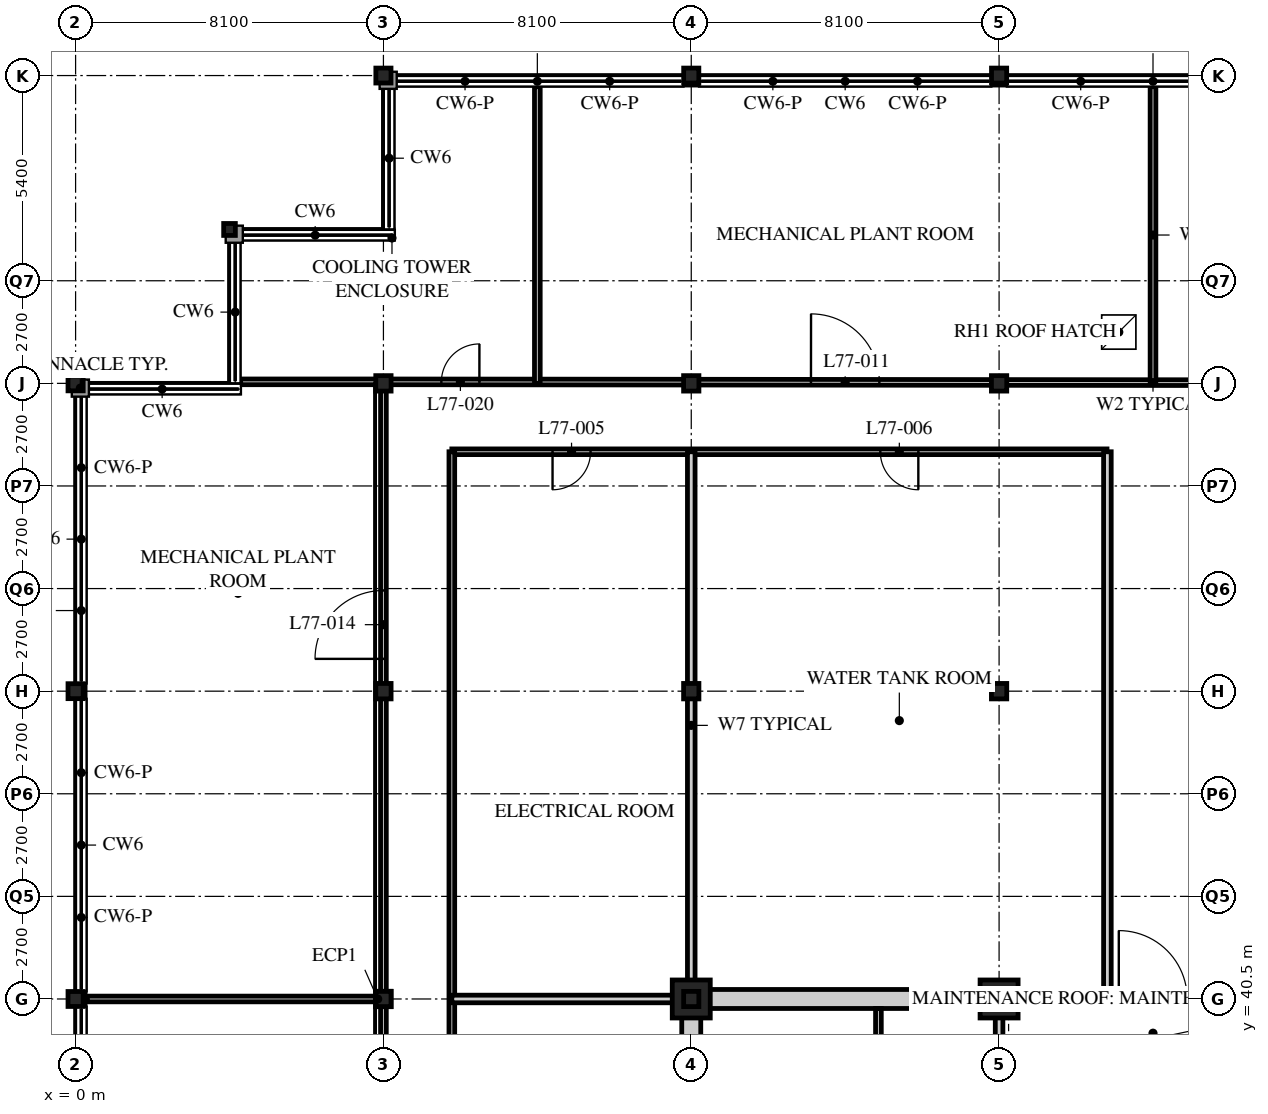
"""IFC4 building model, lengths in metres.
Left out: names, types, materials, properties, quantities, classifications, styles, units other than length and angle.
Written with IfcOpenShell. Run it as: python <this file> out.ifc"""

import sys

from ifc_helpers import new_model, si_unit, direction, frame, frame_2d, origin, origin_2d, place, context, subcontext, project, spatial, rectangle, hollow_rectangle, i_section, extrude, element, fill, save


model = new_model("IFC4")
c1 = context("Model", 3, precision=1e-05, world=origin(), true_north=direction((0.0, 1.0)))
c2 = subcontext(c1, "Body", "Model", "MODEL_VIEW")
j1 = project(units=[si_unit("LENGTHUNIT", "METRE"), si_unit("PLANEANGLEUNIT", "RADIAN")], contexts=[c1])
p1 = place(None, origin())
s1 = spatial("IfcSite", under=j1, at=p1, CompositionType="ELEMENT")
p2 = place(p1, origin())
s2 = spatial("IfcBuilding", under=s1, at=p2, CompositionType="ELEMENT")
p3 = place(p2, frame((0.0, 0.0, 303.9)))
s3 = spatial("IfcBuildingStorey", under=s2, at=p3, CompositionType="ELEMENT", Elevation=303.9)
for number, where, z_axis, x_axis in (
    (1, (0.0, 40.5, 0.0), (0.0, 0.0, 1.0), (1.0, 0.0, 0.0)),
    (2, (0.0, 48.6, 0.0), (0.0, 0.0, 1.0), (1.0, 0.0, 0.0)),
    (3, (0.0, 56.7, 0.0), (0.0, 0.0, 1.0), (1.0, 0.0, 0.0)),
):
    element("IfcColumn", number, at=place(p3, frame(where, z_axis=z_axis, x_axis=x_axis)), inside=s3, PredefinedType="COLUMN", context=c2, shape_type="SweptSolid", body=[
        extrude(i_section(OverallWidth=0.399, OverallDepth=0.394, WebThickness=0.023, FlangeThickness=0.037, FilletRadius=0.015, at=origin_2d()), origin(), (0.0, 0.0, 1.0), 6.0),
    ])
p4 = place(p3, frame((4.05, 60.75, 0.0), z_axis=(0.0, 0.0, 1.0), x_axis=(1.0, 0.0, 0.0)))
e4 = element("IfcColumn", 4, at=p4, inside=s3, PredefinedType="COLUMN", context=c2, shape_type="SweptSolid", body=[
    extrude(i_section(OverallWidth=0.307, OverallDepth=0.314, WebThickness=0.012, FlangeThickness=0.019, FilletRadius=0.015, at=origin_2d()), origin(), (0.0, 0.0, 1.0), 6.0),
])
for number, where, z_axis, x_axis in (
    (5, (8.1, 40.5, 0.0), (0.0, 0.0, 1.0), (1.0, 0.0, 0.0)),
    (6, (8.1, 48.6, 0.0), (0.0, 0.0, 1.0), (1.0, 0.0, 0.0)),
    (7, (8.1, 56.7, 0.0), (0.0, 0.0, 1.0), (1.0, 0.0, 0.0)),
):
    element("IfcColumn", number, at=place(p3, frame(where, z_axis=z_axis, x_axis=x_axis)), inside=s3, PredefinedType="COLUMN", context=c2, shape_type="SweptSolid", body=[
        extrude(i_section(OverallWidth=0.403, OverallDepth=0.406, WebThickness=0.027, FlangeThickness=0.043, FilletRadius=0.015, at=origin_2d()), origin(), (0.0, 0.0, 1.0), 6.0),
    ])
p5 = place(p3, frame((8.1, 64.8, 0.0), z_axis=(0.0, 0.0, 1.0), x_axis=(1.0, 0.0, 0.0)))
e8 = element("IfcColumn", 8, at=p5, inside=s3, PredefinedType="COLUMN", context=c2, shape_type="SweptSolid", body=[
    extrude(i_section(OverallWidth=0.399, OverallDepth=0.394, WebThickness=0.023, FlangeThickness=0.037, FilletRadius=0.015, at=origin_2d()), origin(), (0.0, 0.0, 1.0), 6.0),
])
p6 = place(p3, frame((16.2, 40.5, 0.0), z_axis=(0.0, 0.0, 1.0), x_axis=(1.0, 0.0, 0.0)))
e9 = element("IfcColumn", 9, at=p6, inside=s3, PredefinedType="COLUMN", context=c2, shape_type="SweptSolid", body=[
    extrude(hollow_rectangle(XDim=1.0, YDim=1.0, WallThickness=0.1, at=origin_2d()), origin(), (0.0, 0.0, 1.0), 6.0),
])
for number, where, z_axis, x_axis in (
    (10, (16.2, 48.6, 0.0), (0.0, 0.0, 1.0), (1.0, 0.0, 0.0)),
    (11, (16.2, 56.7, 0.0), (0.0, 0.0, 1.0), (1.0, 0.0, 0.0)),
):
    element("IfcColumn", number, at=place(p3, frame(where, z_axis=z_axis, x_axis=x_axis)), inside=s3, PredefinedType="COLUMN", context=c2, shape_type="SweptSolid", body=[
        extrude(i_section(OverallWidth=0.403, OverallDepth=0.406, WebThickness=0.027, FlangeThickness=0.043, FilletRadius=0.015, at=origin_2d()), origin(), (0.0, 0.0, 1.0), 6.0),
    ])
p7 = place(p3, frame((16.2, 64.8, 0.0), z_axis=(0.0, 0.0, 1.0), x_axis=(1.0, 0.0, 0.0)))
e12 = element("IfcColumn", 12, at=p7, inside=s3, PredefinedType="COLUMN", context=c2, shape_type="SweptSolid", body=[
    extrude(i_section(OverallWidth=0.399, OverallDepth=0.394, WebThickness=0.023, FlangeThickness=0.037, FilletRadius=0.015, at=origin_2d()), origin(), (0.0, 0.0, 1.0), 6.0),
])
p8 = place(p3, frame((24.3, 40.5, 0.0), z_axis=(0.0, 0.0, 1.0), x_axis=(1.0, 0.0, 0.0)))
e13 = element("IfcColumn", 13, at=p8, inside=s3, PredefinedType="COLUMN", context=c2, shape_type="SweptSolid", body=[
    extrude(hollow_rectangle(XDim=1.0, YDim=1.0, WallThickness=0.1, at=origin_2d()), origin(), (0.0, 0.0, 1.0), 6.0),
])
for number, where, z_axis, x_axis in (
    (14, (24.3, 48.6, 0.0), (0.0, 0.0, 1.0), (1.0, 0.0, 0.0)),
    (15, (24.3, 56.7, 0.0), (0.0, 0.0, 1.0), (1.0, 0.0, 0.0)),
):
    element("IfcColumn", number, at=place(p3, frame(where, z_axis=z_axis, x_axis=x_axis)), inside=s3, PredefinedType="COLUMN", context=c2, shape_type="SweptSolid", body=[
        extrude(i_section(OverallWidth=0.403, OverallDepth=0.406, WebThickness=0.027, FlangeThickness=0.043, FilletRadius=0.015, at=origin_2d()), origin(), (0.0, 0.0, 1.0), 6.0),
    ])
p9 = place(p3, frame((24.3, 64.8, 0.0), z_axis=(0.0, 0.0, 1.0), x_axis=(1.0, 0.0, 0.0)))
e16 = element("IfcColumn", 16, at=p9, inside=s3, PredefinedType="COLUMN", context=c2, shape_type="SweptSolid", body=[
    extrude(i_section(OverallWidth=0.399, OverallDepth=0.394, WebThickness=0.023, FlangeThickness=0.037, FilletRadius=0.015, at=origin_2d()), origin(), (0.0, 0.0, 1.0), 6.0),
])
p10 = place(p3, frame((48.35, 64.675, 6.0), z_axis=(0.0, 0.0, 1.0), x_axis=(-1.0, 0.0, 0.0)))
e17 = element("IfcWall", 17, at=p10, inside=s3, PredefinedType="PARAPET", context=c2, shape_type="SweptSolid", body=[
    extrude(rectangle(XDim=40.25, YDim=0.25, at=frame_2d((20.125, 0.0))), origin(), (0.0, 0.0, 1.0), 1.285),
])
p11 = place(p3, frame((8.225, 64.55, 6.0), z_axis=(0.0, 0.0, 1.0), x_axis=(0.0, -1.0, 0.0)))
e18 = element("IfcWall", 18, at=p11, inside=s3, PredefinedType="PARAPET", context=c2, shape_type="SweptSolid", body=[
    extrude(rectangle(XDim=3.8, YDim=0.25, at=frame_2d((1.9, 0.0))), origin(), (0.0, 0.0, 1.0), 1.285),
])
p12 = place(p3, frame((8.35, 60.625, 6.0), z_axis=(0.0, 0.0, 1.0), x_axis=(-1.0, 0.0, 0.0)))
e19 = element("IfcWall", 19, at=p12, inside=s3, PredefinedType="PARAPET", context=c2, shape_type="SweptSolid", body=[
    extrude(rectangle(XDim=4.3, YDim=0.25, at=frame_2d((2.15, 0.0))), origin(), (0.0, 0.0, 1.0), 1.285),
])
p13 = place(p3, frame((4.175, 60.5, 6.0), z_axis=(0.0, 0.0, 1.0), x_axis=(0.0, -1.0, 0.0)))
e20 = element("IfcWall", 20, at=p13, inside=s3, PredefinedType="PARAPET", context=c2, shape_type="SweptSolid", body=[
    extrude(rectangle(XDim=3.8, YDim=0.25, at=frame_2d((1.9, 0.0))), origin(), (0.0, 0.0, 1.0), 1.285),
])
p14 = place(p3, frame((4.3, 56.575, 6.0), z_axis=(0.0, 0.0, 1.0), x_axis=(-1.0, 0.0, 0.0)))
e21 = element("IfcWall", 21, at=p14, inside=s3, PredefinedType="PARAPET", context=c2, shape_type="SweptSolid", body=[
    extrude(rectangle(XDim=4.3, YDim=0.25, at=frame_2d((2.15, 0.0))), origin(), (0.0, 0.0, 1.0), 1.285),
])
p15 = place(p3, frame((0.125, 56.45, 6.0), z_axis=(0.0, 0.0, 1.0), x_axis=(0.0, -1.0, 0.0)))
e22 = element("IfcWall", 22, at=p15, inside=s3, PredefinedType="PARAPET", context=c2, shape_type="SweptSolid", body=[
    extrude(rectangle(XDim=32.15, YDim=0.25, at=frame_2d((16.075, 0.0))), origin(), (0.0, 0.0, 1.0), 1.285),
])
for number, where, z_axis, x_axis in (
    (23, (8.1, 40.5, 6.0), (0.0, 0.0, 1.0), (1.0, 0.0, 0.0)),
    (24, (16.2, 40.5, 6.0), (0.0, 0.0, 1.0), (1.0, 0.0, 0.0)),
    (25, (24.3, 40.5, 6.0), (0.0, 0.0, 1.0), (1.0, 0.0, 0.0)),
):
    element("IfcColumn", number, at=place(p3, frame(where, z_axis=z_axis, x_axis=x_axis)), inside=s3, PredefinedType="COLUMN", context=c2, shape_type="SweptSolid", body=[
        extrude(hollow_rectangle(XDim=0.4, YDim=0.4, WallThickness=0.016, at=origin_2d()), origin(), (0.0, 0.0, 1.0), 13.896),
    ])
p16 = place(p3, frame((8.1, 56.74, 0.0), z_axis=(0.0, 0.0, 1.0), x_axis=(0.999999511317, -0.000988618344, 0.0)))
e26 = element("IfcWall", 26, at=p16, inside=s3, PredefinedType="PARTITIONING", context=c2, shape_type="SweptSolid", body=[
    extrude(rectangle(XDim=40.5, YDim=0.15, at=frame_2d((20.25, 0.0))), origin(), (0.0, 0.0, 1.0), 5.038),
])
p17 = place(p16, frame((11.25, 0.0, 0.0)))
e27 = element("IfcOpeningElement", 27, at=p17, cuts=e26, PredefinedType="OPENING", context=c2, shape_type="SweptSolid", body=[
    extrude(rectangle(XDim=1.8, YDim=2.4, at=frame_2d((0.9, 1.2))), frame((0.0, 0.085, 0.0), z_axis=(0.0, -1.0, 0.0), x_axis=(1.0, 0.0, 0.0)), (0.0, 0.0, 1.0), 0.17),
])
p18 = place(p16, frame((27.45, 0.0, 0.0)))
e28 = element("IfcOpeningElement", 28, at=p18, cuts=e26, PredefinedType="OPENING", context=c2, shape_type="SweptSolid", body=[
    extrude(rectangle(XDim=1.8, YDim=2.4, at=frame_2d((0.9, 1.2))), frame((0.0, 0.085, 0.0), z_axis=(0.0, -1.0, 0.0), x_axis=(1.0, 0.0, 0.0)), (0.0, 0.0, 1.0), 0.17),
])
p19 = place(p16, frame((37.975, 0.0, 0.0)))
e29 = element("IfcOpeningElement", 29, at=p19, cuts=e26, PredefinedType="OPENING", context=c2, shape_type="SweptSolid", body=[
    extrude(rectangle(XDim=1.0, YDim=2.1, at=frame_2d((0.5, 1.05))), frame((0.0, 0.085, 0.0), z_axis=(0.0, -1.0, 0.0), x_axis=(1.0, 0.0, 0.0)), (0.0, 0.0, 1.0), 0.17),
])
p20 = place(p16, frame((1.525, 0.0, 0.0)))
e30 = element("IfcOpeningElement", 30, at=p20, cuts=e26, PredefinedType="OPENING", context=c2, shape_type="SweptSolid", body=[
    extrude(rectangle(XDim=1.0, YDim=2.1, at=frame_2d((0.5, 1.05))), frame((0.0, 0.085, 0.0), z_axis=(0.0, -1.0, 0.0), x_axis=(1.0, 0.0, 0.0)), (0.0, 0.0, 1.0), 0.17),
])
p21 = place(p3, frame((8.1, 22.5, 0.0), z_axis=(0.0, 0.0, 1.0), x_axis=(0.0, 1.0, 0.0)))
e31 = element("IfcWall", 31, at=p21, inside=s3, PredefinedType="PARTITIONING", context=c2, shape_type="SweptSolid", body=[
    extrude(rectangle(XDim=34.24, YDim=0.15, at=frame_2d((17.12, 0.0))), origin(), (0.0, 0.0, 1.0), 5.038),
])
p22 = place(p21, frame((7.1, 0.0, 0.0)))
e32 = element("IfcOpeningElement", 32, at=p22, cuts=e31, PredefinedType="OPENING", context=c2, shape_type="SweptSolid", body=[
    extrude(rectangle(XDim=1.8, YDim=2.4, at=frame_2d((0.9, 1.2))), frame((0.0, 0.085, 0.0), z_axis=(0.0, -1.0, 0.0), x_axis=(1.0, 0.0, 0.0)), (0.0, 0.0, 1.0), 0.17),
])
p23 = place(p21, frame((26.95, 0.0, 0.0)))
e33 = element("IfcOpeningElement", 33, at=p23, cuts=e31, PredefinedType="OPENING", context=c2, shape_type="SweptSolid", body=[
    extrude(rectangle(XDim=1.8, YDim=2.4, at=frame_2d((0.9, 1.2))), frame((0.0, 0.085, 0.0), z_axis=(0.0, -1.0, 0.0), x_axis=(1.0, 0.0, 0.0)), (0.0, 0.0, 1.0), 0.17),
])
p24 = place(p3, frame((27.14, 54.9, 0.0), z_axis=(0.0, 0.0, 1.0), x_axis=(-1.0, 0.0, 0.0)))
e34 = element("IfcWall", 34, at=p24, inside=s3, PredefinedType="PARTITIONING", context=c2, shape_type="SweptSolid", body=[
    extrude(rectangle(XDim=17.24, YDim=0.15, at=frame_2d((8.62, 0.0))), origin(), (0.0, 0.0, 1.0), 5.8),
])
p25 = place(p24, frame((13.59, 0.0, 0.0)))
e35 = element("IfcOpeningElement", 35, at=p25, cuts=e34, PredefinedType="OPENING", context=c2, shape_type="SweptSolid", body=[
    extrude(rectangle(XDim=1.0, YDim=2.1, at=frame_2d((0.5, 1.05))), frame((0.0, 0.085, 0.0), z_axis=(0.0, -1.0, 0.0), x_axis=(1.0, 0.0, 0.0)), (0.0, 0.0, 1.0), 0.17),
])
p26 = place(p24, frame((4.965, 0.0, 0.0)))
e36 = element("IfcOpeningElement", 36, at=p26, cuts=e34, PredefinedType="OPENING", context=c2, shape_type="SweptSolid", body=[
    extrude(rectangle(XDim=1.0, YDim=2.1, at=frame_2d((0.5, 1.05))), frame((0.0, 0.085, 0.0), z_axis=(0.0, -1.0, 0.0), x_axis=(1.0, 0.0, 0.0)), (0.0, 0.0, 1.0), 0.17),
])
p27 = place(p3, frame((9.9, 54.9, 0.0), z_axis=(0.0, 0.0, 1.0), x_axis=(0.0, -1.0, 0.0)))
e37 = element("IfcWall", 37, at=p27, inside=s3, PredefinedType="PARTITIONING", context=c2, shape_type="SweptSolid", body=[
    extrude(rectangle(XDim=30.6, YDim=0.15, at=frame_2d((15.3, 0.0))), origin(), (0.0, 0.0, 1.0), 5.8),
])
p28 = place(p27, frame((26.05, 0.0, 0.0)))
e38 = element("IfcOpeningElement", 38, at=p28, cuts=e37, PredefinedType="OPENING", context=c2, shape_type="SweptSolid", body=[
    extrude(rectangle(XDim=1.0, YDim=2.1, at=frame_2d((0.5, 1.05))), frame((0.0, 0.085, 0.0), z_axis=(0.0, -1.0, 0.0), x_axis=(1.0, 0.0, 0.0)), (0.0, 0.0, 1.0), 0.17),
])
p29 = place(p27, frame((17.95, 0.0, 0.0)))
e39 = element("IfcOpeningElement", 39, at=p29, cuts=e37, PredefinedType="OPENING", context=c2, shape_type="SweptSolid", body=[
    extrude(rectangle(XDim=1.0, YDim=2.1, at=frame_2d((0.5, 1.05))), frame((0.0, 0.085, 0.0), z_axis=(0.0, -1.0, 0.0), x_axis=(1.0, 0.0, 0.0)), (0.0, 0.0, 1.0), 0.17),
])
p30 = place(p3, frame((16.2, 40.5, 0.0), z_axis=(0.0, 0.0, 1.0), x_axis=(0.0, 1.0, 0.0)))
e40 = element("IfcWall", 40, at=p30, inside=s3, PredefinedType="SOLIDWALL", context=c2, shape_type="SweptSolid", body=[
    extrude(rectangle(XDim=14.4, YDim=0.2, at=frame_2d((7.2, 0.0))), origin(), (0.0, 0.0, 1.0), 5.038),
])
p31 = place(p3, frame((27.15, 40.5, 0.0), z_axis=(0.0, 0.0, 1.0), x_axis=(0.0, 1.0, 0.0)))
e41 = element("IfcWall", 41, at=p31, inside=s3, PredefinedType="SOLIDWALL", context=c2, shape_type="SweptSolid", body=[
    extrude(rectangle(XDim=14.4, YDim=0.2, at=frame_2d((7.2, 0.0))), origin(), (0.0, 0.0, 1.0), 5.8),
])
p32 = place(p3, frame((9.9, 40.5, 0.0), z_axis=(0.0, 0.0, 1.0), x_axis=(1.0, 0.0, 0.0)))
e42 = element("IfcWall", 42, at=p32, inside=s3, PredefinedType="SOLIDWALL", context=c2, shape_type="SweptSolid", body=[
    extrude(rectangle(XDim=6.3, YDim=0.2, at=frame_2d((3.15, 0.0))), origin(), (0.0, 0.0, 1.0), 5.038),
])
p33 = place(p3, frame((28.35, 56.7, 0.0), z_axis=(0.0, 0.0, 1.0), x_axis=(0.0, 1.0, 0.0)))
e43 = element("IfcWall", 43, at=p33, inside=s3, PredefinedType="PARTITIONING", context=c2, shape_type="SweptSolid", body=[
    extrude(rectangle(XDim=7.807, YDim=0.15, at=frame_2d((3.904, 0.0))), origin(), (0.0, 0.0, 1.0), 5.8),
])
p34 = place(p3, frame((8.1, 40.5, 0.0), z_axis=(0.0, 0.0, 1.0), x_axis=(-1.0, 0.0, 0.0)))
e44 = element("IfcWall", 44, at=p34, inside=s3, PredefinedType="PARTITIONING", context=c2, shape_type="SweptSolid", body=[
    extrude(rectangle(XDim=7.8, YDim=0.15, at=frame_2d((3.9, 0.0))), origin(), (0.0, 0.0, 1.0), 5.038),
])
p35 = place(p3, frame((4.343, 56.74, 0.0), z_axis=(0.0, 0.0, 1.0), x_axis=(1.0, 0.0, 0.0)))
e45 = element("IfcWall", 45, at=p35, inside=s3, PredefinedType="PARTITIONING", context=c2, shape_type="SweptSolid", body=[
    extrude(rectangle(XDim=3.757, YDim=0.15, at=frame_2d((1.878, 0.0))), origin(), (0.0, 0.0, 1.0), 5.038),
])
p36 = place(p3, frame((12.15, 56.7, 0.0), z_axis=(0.0, 0.0, 1.0), x_axis=(0.0, 1.0, 0.0)))
e46 = element("IfcWall", 46, at=p36, inside=s3, PredefinedType="PARTITIONING", context=c2, shape_type="SweptSolid", body=[
    extrude(rectangle(XDim=7.807, YDim=0.15, at=frame_2d((3.904, 0.0))), origin(), (0.0, 0.0, 1.0), 5.8),
])
p37 = place(p3, frame((15.95, 40.5, 0.0), z_axis=(0.0, 0.0, 1.0), x_axis=(1.0, 0.0, 0.0)))
e47 = element("IfcWall", 47, at=p37, inside=s3, PredefinedType="SOLIDWALL", context=c2, shape_type="SweptSolid", body=[
    extrude(rectangle(XDim=24.8, YDim=0.5, at=frame_2d((12.4, 0.0))), origin(), (0.0, 0.0, 1.0), 5.038),
])
p38 = place(p37, frame((11.5, 0.0, 0.0)))
e48 = element("IfcOpeningElement", 48, at=p38, cuts=e47, PredefinedType="OPENING", context=c2, shape_type="SweptSolid", body=[
    extrude(rectangle(XDim=1.8, YDim=2.4, at=frame_2d((0.9, 1.2))), frame((0.0, 0.26, 0.0), z_axis=(0.0, -1.0, 0.0), x_axis=(1.0, 0.0, 0.0)), (0.0, 0.0, 1.0), 0.52),
])
p39 = place(p3, frame((16.2, 24.55, 0.0), z_axis=(0.0, 0.0, 1.0), x_axis=(0.0, 1.0, 0.0)))
e49 = element("IfcWall", 49, at=p39, inside=s3, PredefinedType="SOLIDWALL", context=c2, shape_type="SweptSolid", body=[
    extrude(rectangle(XDim=15.7, YDim=0.5, at=frame_2d((7.85, 0.0))), origin(), (0.0, 0.0, 1.0), 5.038),
])
p40 = place(p3, frame((24.3, 32.5, 0.0), z_axis=(0.0, 0.0, 1.0), x_axis=(0.0, 1.0, 0.0)))
e50 = element("IfcWall", 50, at=p40, inside=s3, PredefinedType="PARTITIONING", context=c2, shape_type="SweptSolid", body=[
    extrude(rectangle(XDim=7.75, YDim=0.2, at=frame_2d((3.875, 0.0))), origin(), (0.0, 0.0, 1.0), 5.038),
])
p41 = place(p40, frame((0.85, 0.0, 0.0)))
e51 = element("IfcOpeningElement", 51, at=p41, cuts=e50, PredefinedType="OPENING", context=c2, shape_type="SweptSolid", body=[
    extrude(rectangle(XDim=0.9, YDim=2.1, at=frame_2d((0.45, 1.05))), frame((0.0, 0.11, 0.0), z_axis=(0.0, -1.0, 0.0), x_axis=(1.0, 0.0, 0.0)), (0.0, 0.0, 1.0), 0.22),
])
p42 = place(p40, frame((3.05, 0.0, 0.0)))
e52 = element("IfcOpeningElement", 52, at=p42, cuts=e50, PredefinedType="OPENING", context=c2, shape_type="SweptSolid", body=[
    extrude(rectangle(XDim=0.9, YDim=2.1, at=frame_2d((0.45, 1.05))), frame((0.0, 0.11, 0.0), z_axis=(0.0, -1.0, 0.0), x_axis=(1.0, 0.0, 0.0)), (0.0, 0.0, 1.0), 0.22),
])
p43 = place(p40, frame((5.625, 0.0, 0.0)))
e53 = element("IfcOpeningElement", 53, at=p43, cuts=e50, PredefinedType="OPENING", context=c2, shape_type="SweptSolid", body=[
    extrude(rectangle(XDim=0.9, YDim=2.1, at=frame_2d((0.45, 1.05))), frame((0.0, 0.11, 0.0), z_axis=(0.0, -1.0, 0.0), x_axis=(1.0, 0.0, 0.0)), (0.0, 0.0, 1.0), 0.22),
])
p44 = place(p3, frame((21.125, 36.9, 0.0), z_axis=(0.0, 0.0, 1.0), x_axis=(0.0, 1.0, 0.0)))
e54 = element("IfcWall", 54, at=p44, inside=s3, PredefinedType="PARTITIONING", context=c2, shape_type="SweptSolid", body=[
    extrude(rectangle(XDim=3.35, YDim=0.15, at=frame_2d((1.675, 0.0))), origin(), (0.0, 0.0, 1.0), 5.8),
])
p45 = place(p25, origin())
e55 = element("IfcDoor", 55, at=p45, inside=s3, OperationType="SINGLE_SWING_RIGHT", PredefinedType="DOOR", context=c2, shape_type="SweptSolid", body=[
    extrude(rectangle(XDim=1.0, YDim=2.1, at=frame_2d((0.5, 1.05))), frame((0.0, 0.025, 0.0), z_axis=(0.0, -1.0, 0.0), x_axis=(1.0, 0.0, 0.0)), (0.0, 0.0, 1.0), 0.05),
])
fill(e35, e55)
p46 = place(p26, origin())
e56 = element("IfcDoor", 56, at=p46, inside=s3, OperationType="SINGLE_SWING_LEFT", PredefinedType="DOOR", context=c2, shape_type="SweptSolid", body=[
    extrude(rectangle(XDim=1.0, YDim=2.1, at=frame_2d((0.5, 1.05))), frame((0.0, 0.025, 0.0), z_axis=(0.0, -1.0, 0.0), x_axis=(1.0, 0.0, 0.0)), (0.0, 0.0, 1.0), 0.05),
])
fill(e36, e56)
p47 = place(p17, origin())
e57 = element("IfcDoor", 57, at=p47, inside=s3, OperationType="DOUBLE_DOOR_SINGLE_SWING", PredefinedType="DOOR", context=c2, shape_type="SweptSolid", body=[
    extrude(rectangle(XDim=1.8, YDim=2.4, at=frame_2d((0.9, 1.2))), frame((0.0, 0.025, 0.0), z_axis=(0.0, -1.0, 0.0), x_axis=(1.0, 0.0, 0.0)), (0.0, 0.0, 1.0), 0.05),
])
fill(e27, e57)
p48 = place(p23, origin())
e58 = element("IfcDoor", 58, at=p48, inside=s3, OperationType="DOUBLE_DOOR_SINGLE_SWING", PredefinedType="DOOR", context=c2, shape_type="SweptSolid", body=[
    extrude(rectangle(XDim=1.8, YDim=2.4, at=frame_2d((0.9, 1.2))), frame((0.0, 0.025, 0.0), z_axis=(0.0, -1.0, 0.0), x_axis=(1.0, 0.0, 0.0)), (0.0, 0.0, 1.0), 0.05),
])
fill(e33, e58)
p49 = place(p20, origin())
e59 = element("IfcDoor", 59, at=p49, inside=s3, OperationType="SINGLE_SWING_RIGHT", PredefinedType="DOOR", context=c2, shape_type="SweptSolid", body=[
    extrude(rectangle(XDim=1.0, YDim=2.1, at=frame_2d((0.5, 1.05))), frame((0.0, 0.025, 0.0), z_axis=(0.0, -1.0, 0.0), x_axis=(1.0, 0.0, 0.0)), (0.0, 0.0, 1.0), 0.05),
])
fill(e30, e59)
p50 = place(p38, origin())
e60 = element("IfcDoor", 60, at=p50, inside=s3, OperationType="DOUBLE_DOOR_SINGLE_SWING", PredefinedType="DOOR", context=c2, shape_type="SweptSolid", body=[
    extrude(rectangle(XDim=1.8, YDim=2.4, at=frame_2d((0.9, 1.2))), frame((0.0, 0.025, 0.0), z_axis=(0.0, -1.0, 0.0), x_axis=(1.0, 0.0, 0.0)), (0.0, 0.0, 1.0), 0.05),
])
fill(e48, e60)
save(model, sys.argv[1])
